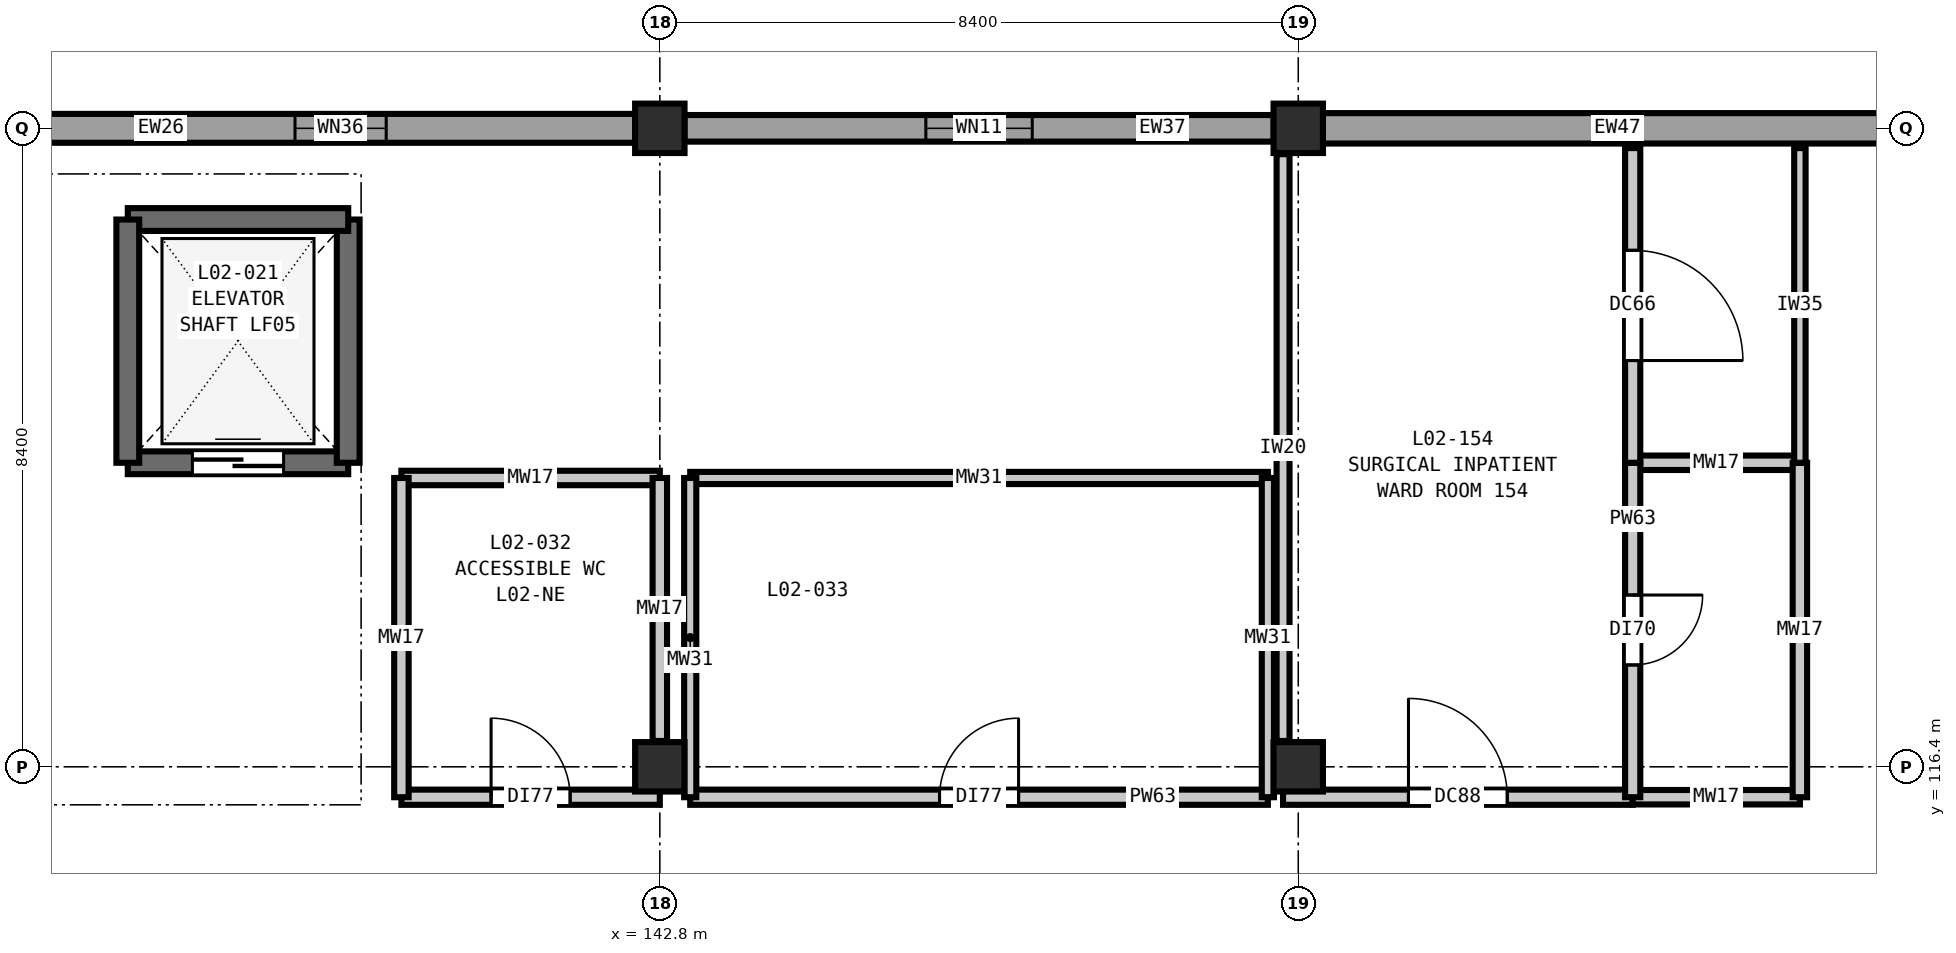
"""IFC4 building model, lengths in metres.
Left out: names, types, materials, properties, quantities, classifications, styles, units other than length and angle.
Written with IfcOpenShell. Run it as: python <this file> out.ifc"""

import sys

from ifc_helpers import new_model, si_unit, direction, frame, frame_2d, origin, origin_2d, place, context, subcontext, project, spatial, rectangle, extrude, element, fill, save


model = new_model("IFC4")
c1 = context("Model", 3, precision=1e-05, world=origin(), true_north=direction((0.0, 1.0)))
c2 = subcontext(c1, "Body", "Model", "MODEL_VIEW")
j1 = project(units=[si_unit("LENGTHUNIT", "METRE"), si_unit("PLANEANGLEUNIT", "RADIAN")], contexts=[c1])
p1 = place(None, origin())
s1 = spatial("IfcSite", under=j1, at=p1, CompositionType="ELEMENT")
p2 = place(p1, origin())
s2 = spatial("IfcBuilding", under=s1, at=p2, CompositionType="ELEMENT")
p3 = place(p2, frame((0.0, 0.0, 10.8)))
s3 = spatial("IfcBuildingStorey", under=s2, at=p3, CompositionType="ELEMENT", Elevation=10.8)
for number, where, z_axis, x_axis in (
    (1, (142.8, 116.4, 0.0), (0.0, 0.0, 1.0), (1.0, 0.0, 0.0)),
    (2, (142.8, 124.8, 0.0), (0.0, 0.0, 1.0), (1.0, 0.0, 0.0)),
    (3, (151.2, 116.4, 0.0), (0.0, 0.0, 1.0), (1.0, 0.0, 0.0)),
    (4, (151.2, 124.8, 0.0), (0.0, 0.0, 1.0), (1.0, 0.0, 0.0)),
):
    element("IfcColumn", number, at=place(p3, frame(where, z_axis=z_axis, x_axis=x_axis)), inside=s3, PredefinedType="COLUMN", context=c2, shape_type="SweptSolid", body=[
        extrude(rectangle(XDim=0.65, YDim=0.65, at=origin_2d()), origin(), (0.0, 0.0, 1.0), 5.4),
    ])
p4 = place(p3, frame((134.723, 124.8, 0.0), z_axis=(0.0, 0.0, 1.0), x_axis=(1.0, 0.0, 0.0)))
e5 = element("IfcWall", 5, at=p4, inside=s3, PredefinedType="SOLIDWALL", context=c2, shape_type="SweptSolid", body=[
    extrude(rectangle(XDim=7.754, YDim=0.38, at=frame_2d((3.877, 0.0))), origin(), (0.0, 0.0, 1.0), 4.68),
])
p5 = place(p4, frame((3.277, 0.0, 0.9)))
e6 = element("IfcOpeningElement", 6, at=p5, cuts=e5, PredefinedType="OPENING", context=c2, shape_type="SweptSolid", body=[
    extrude(rectangle(XDim=1.2, YDim=2.15, at=frame_2d((0.6, 1.075))), frame((0.0, 0.2, 0.0), z_axis=(0.0, -1.0, 0.0), x_axis=(1.0, 0.0, 0.0)), (0.0, 0.0, 1.0), 0.4),
])
p6 = place(p3, frame((143.123, 124.8, 0.0), z_axis=(0.0, 0.0, 1.0), x_axis=(1.0, 0.0, 0.0)))
e7 = element("IfcWall", 7, at=p6, inside=s3, PredefinedType="SOLIDWALL", context=c2, shape_type="SweptSolid", body=[
    extrude(rectangle(XDim=7.754, YDim=0.35, at=frame_2d((3.877, 0.0))), origin(), (0.0, 0.0, 1.0), 4.68),
])
p7 = place(p6, frame((3.177, 0.0, 0.9)))
e8 = element("IfcOpeningElement", 8, at=p7, cuts=e7, PredefinedType="OPENING", context=c2, shape_type="SweptSolid", body=[
    extrude(rectangle(XDim=1.4, YDim=2.15, at=frame_2d((0.7, 1.075))), frame((0.0, 0.185, 0.0), z_axis=(0.0, -1.0, 0.0), x_axis=(1.0, 0.0, 0.0)), (0.0, 0.0, 1.0), 0.37),
])
p8 = place(p3, frame((151.523, 124.8, 0.0), z_axis=(0.0, 0.0, 1.0), x_axis=(1.0, 0.0, 0.0)))
e9 = element("IfcWall", 9, at=p8, inside=s3, PredefinedType="SOLIDWALL", context=c2, shape_type="SweptSolid", body=[
    extrude(rectangle(XDim=7.754, YDim=0.4, at=frame_2d((3.877, 0.0))), origin(), (0.0, 0.0, 1.0), 4.68),
])
p9 = place(p3, frame((135.8, 120.4, 0.0), z_axis=(0.0, 0.0, 1.0), x_axis=(1.0, 0.0, 0.0)))
e10 = element("IfcWall", 10, at=p9, inside=s3, PredefinedType="SHEAR", context=c2, shape_type="SweptSolid", body=[
    extrude(rectangle(XDim=2.9, YDim=0.3, at=frame_2d((1.45, 0.0))), origin(), (0.0, 0.0, 1.0), 5.4),
])
p10 = place(p9, frame((0.85, 0.0, 0.0)))
e11 = element("IfcOpeningElement", 11, at=p10, cuts=e10, PredefinedType="OPENING", context=c2, shape_type="SweptSolid", body=[
    extrude(rectangle(XDim=1.2, YDim=2.2, at=frame_2d((0.6, 1.1))), frame((0.0, 0.16, 0.0), z_axis=(0.0, -1.0, 0.0), x_axis=(1.0, 0.0, 0.0)), (0.0, 0.0, 1.0), 0.32),
])
p11 = place(p3, frame((138.7, 120.4, 0.0), z_axis=(0.0, 0.0, 1.0), x_axis=(0.0, 1.0, 0.0)))
e12 = element("IfcWall", 12, at=p11, inside=s3, PredefinedType="SHEAR", context=c2, shape_type="SweptSolid", body=[
    extrude(rectangle(XDim=3.2, YDim=0.3, at=frame_2d((1.6, 0.0))), origin(), (0.0, 0.0, 1.0), 5.4),
])
p12 = place(p3, frame((138.7, 123.6, 0.0), z_axis=(0.0, 0.0, 1.0), x_axis=(-1.0, 0.0, 0.0)))
e13 = element("IfcWall", 13, at=p12, inside=s3, PredefinedType="SHEAR", context=c2, shape_type="SweptSolid", body=[
    extrude(rectangle(XDim=2.9, YDim=0.3, at=frame_2d((1.45, 0.0))), origin(), (0.0, 0.0, 1.0), 5.4),
])
p13 = place(p3, frame((135.8, 123.6, 0.0), z_axis=(0.0, 0.0, 1.0), x_axis=(0.0, -1.0, 0.0)))
e14 = element("IfcWall", 14, at=p13, inside=s3, PredefinedType="SHEAR", context=c2, shape_type="SweptSolid", body=[
    extrude(rectangle(XDim=3.2, YDim=0.3, at=frame_2d((1.6, 0.0))), origin(), (0.0, 0.0, 1.0), 5.4),
])
p14 = place(p3, frame((139.4, 116.0, 0.0), z_axis=(0.0, 0.0, 1.0), x_axis=(1.0, 0.0, 0.0)))
e15 = element("IfcWall", 15, at=p14, inside=s3, PredefinedType="PARTITIONING", context=c2, shape_type="SweptSolid", body=[
    extrude(rectangle(XDim=3.4, YDim=0.2, at=frame_2d((1.7, 0.0))), origin(), (0.0, 0.0, 1.0), 5.07),
])
p15 = place(p14, frame((1.18, 0.0, 0.0)))
e16 = element("IfcOpeningElement", 16, at=p15, cuts=e15, PredefinedType="OPENING", context=c2, shape_type="SweptSolid", body=[
    extrude(rectangle(XDim=1.04, YDim=2.1, at=frame_2d((0.52, 1.05))), frame((0.0, 0.11, 0.0), z_axis=(0.0, -1.0, 0.0), x_axis=(1.0, 0.0, 0.0)), (0.0, 0.0, 1.0), 0.22),
])
p16 = place(p3, frame((143.2, 116.0, 0.0), z_axis=(0.0, 0.0, 1.0), x_axis=(1.0, 0.0, 0.0)))
e17 = element("IfcWall", 17, at=p16, inside=s3, PredefinedType="PARTITIONING", context=c2, shape_type="SweptSolid", body=[
    extrude(rectangle(XDim=7.6, YDim=0.2, at=frame_2d((3.8, 0.0))), origin(), (0.0, 0.0, 1.0), 5.07),
])
p17 = place(p16, frame((3.28, 0.0, 0.0)))
e18 = element("IfcOpeningElement", 18, at=p17, cuts=e17, PredefinedType="OPENING", context=c2, shape_type="SweptSolid", body=[
    extrude(rectangle(XDim=1.04, YDim=2.1, at=frame_2d((0.52, 1.05))), frame((0.0, 0.11, 0.0), z_axis=(0.0, -1.0, 0.0), x_axis=(1.0, 0.0, 0.0)), (0.0, 0.0, 1.0), 0.22),
])
p18 = place(p3, frame((151.0, 116.0, 0.0), z_axis=(0.0, 0.0, 1.0), x_axis=(1.0, 0.0, 0.0)))
e19 = element("IfcWall", 19, at=p18, inside=s3, PredefinedType="PARTITIONING", context=c2, shape_type="SweptSolid", body=[
    extrude(rectangle(XDim=4.6, YDim=0.2, at=frame_2d((2.3, 0.0))), origin(), (0.0, 0.0, 1.0), 5.07),
])
p19 = place(p18, frame((1.65, 0.0, 0.0)))
e20 = element("IfcOpeningElement", 20, at=p19, cuts=e19, PredefinedType="OPENING", context=c2, shape_type="SweptSolid", body=[
    extrude(rectangle(XDim=1.3, YDim=2.2, at=frame_2d((0.65, 1.1))), frame((0.0, 0.11, 0.0), z_axis=(0.0, -1.0, 0.0), x_axis=(1.0, 0.0, 0.0)), (0.0, 0.0, 1.0), 0.22),
])
p20 = place(p3, frame((155.6, 116.0, 0.0), z_axis=(0.0, 0.0, 1.0), x_axis=(1.0, 0.0, 0.0)))
e21 = element("IfcWall", 21, at=p20, inside=s3, PredefinedType="PLUMBINGWALL", context=c2, shape_type="SweptSolid", body=[
    extrude(rectangle(XDim=2.2, YDim=0.19, at=frame_2d((1.1, 0.0))), origin(), (0.0, 0.0, 1.0), 5.07),
])
p21 = place(p3, frame((139.4, 120.2, 0.0), z_axis=(0.0, 0.0, 1.0), x_axis=(1.0, 0.0, 0.0)))
e22 = element("IfcWall", 22, at=p21, inside=s3, PredefinedType="PLUMBINGWALL", context=c2, shape_type="SweptSolid", body=[
    extrude(rectangle(XDim=3.4, YDim=0.19, at=frame_2d((1.7, 0.0))), origin(), (0.0, 0.0, 1.0), 5.07),
])
p22 = place(p3, frame((143.2, 120.2, 0.0), z_axis=(0.0, 0.0, 1.0), x_axis=(1.0, 0.0, 0.0)))
e23 = element("IfcWall", 23, at=p22, inside=s3, PredefinedType="PLUMBINGWALL", context=c2, shape_type="SweptSolid", body=[
    extrude(rectangle(XDim=7.6, YDim=0.16, at=frame_2d((3.8, 0.0))), origin(), (0.0, 0.0, 1.0), 5.07),
])
p23 = place(p3, frame((155.6, 120.4, 0.0), z_axis=(0.0, 0.0, 1.0), x_axis=(1.0, 0.0, 0.0)))
e24 = element("IfcWall", 24, at=p23, inside=s3, PredefinedType="PLUMBINGWALL", context=c2, shape_type="SweptSolid", body=[
    extrude(rectangle(XDim=2.2, YDim=0.19, at=frame_2d((1.1, 0.0))), origin(), (0.0, 0.0, 1.0), 5.07),
])
p24 = place(p3, frame((139.4, 116.0, 0.0), z_axis=(0.0, 0.0, 1.0), x_axis=(0.0, 1.0, 0.0)))
e25 = element("IfcWall", 25, at=p24, inside=s3, PredefinedType="PLUMBINGWALL", context=c2, shape_type="SweptSolid", body=[
    extrude(rectangle(XDim=4.2, YDim=0.19, at=frame_2d((2.1, 0.0))), origin(), (0.0, 0.0, 1.0), 5.07),
])
p25 = place(p3, frame((142.8, 116.74, 0.0), z_axis=(0.0, 0.0, 1.0), x_axis=(0.0, 1.0, 0.0)))
e26 = element("IfcWall", 26, at=p25, inside=s3, PredefinedType="PLUMBINGWALL", context=c2, shape_type="SweptSolid", body=[
    extrude(rectangle(XDim=3.46, YDim=0.19, at=frame_2d((1.73, 0.0))), origin(), (0.0, 0.0, 1.0), 4.735),
])
for number, where, z_axis, x_axis in (
    (27, (143.2, 116.0, 0.0), (0.0, 0.0, 1.0), (0.0, 1.0, 0.0)),
    (28, (150.8, 116.0, 0.0), (0.0, 0.0, 1.0), (0.0, 1.0, 0.0)),
):
    element("IfcWall", number, at=place(p3, frame(where, z_axis=z_axis, x_axis=x_axis)), inside=s3, PredefinedType="PLUMBINGWALL", context=c2, shape_type="SweptSolid", body=[
        extrude(rectangle(XDim=4.2, YDim=0.16, at=frame_2d((2.1, 0.0))), origin(), (0.0, 0.0, 1.0), 5.07),
    ])
p26 = place(p3, frame((151.0, 116.74, 0.0), z_axis=(0.0, 0.0, 1.0), x_axis=(0.0, 1.0, 0.0)))
e29 = element("IfcWall", 29, at=p26, inside=s3, PredefinedType="PARTITIONING", context=c2, shape_type="SweptSolid", body=[
    extrude(rectangle(XDim=7.72, YDim=0.17, at=frame_2d((3.86, 0.0))), origin(), (0.0, 0.0, 1.0), 4.735),
])
p27 = place(p3, frame((155.6, 116.0, 0.0), z_axis=(0.0, 0.0, 1.0), x_axis=(0.0, 1.0, 0.0)))
e30 = element("IfcWall", 30, at=p27, inside=s3, PredefinedType="PARTITIONING", context=c2, shape_type="SweptSolid", body=[
    extrude(rectangle(XDim=4.4, YDim=0.2, at=frame_2d((2.2, 0.0))), origin(), (0.0, 0.0, 1.0), 5.07),
])
p28 = place(p27, frame((1.74, 0.0, 0.0)))
e31 = element("IfcOpeningElement", 31, at=p28, cuts=e30, PredefinedType="OPENING", context=c2, shape_type="SweptSolid", body=[
    extrude(rectangle(XDim=0.92, YDim=2.1, at=frame_2d((0.46, 1.05))), frame((0.0, 0.11, 0.0), z_axis=(0.0, -1.0, 0.0), x_axis=(1.0, 0.0, 0.0)), (0.0, 0.0, 1.0), 0.22),
])
p29 = place(p3, frame((155.6, 120.4, 0.0), z_axis=(0.0, 0.0, 1.0), x_axis=(0.0, 1.0, 0.0)))
e32 = element("IfcWall", 32, at=p29, inside=s3, PredefinedType="PARTITIONING", context=c2, shape_type="SweptSolid", body=[
    extrude(rectangle(XDim=4.14, YDim=0.2, at=frame_2d((2.07, 0.0))), origin(), (0.0, 0.0, 1.0), 5.07),
])
p30 = place(p29, frame((1.345, 0.0, 0.0)))
e33 = element("IfcOpeningElement", 33, at=p30, cuts=e32, PredefinedType="OPENING", context=c2, shape_type="SweptSolid", body=[
    extrude(rectangle(XDim=1.45, YDim=2.25, at=frame_2d((0.725, 1.125))), frame((0.0, 0.11, 0.0), z_axis=(0.0, -1.0, 0.0), x_axis=(1.0, 0.0, 0.0)), (0.0, 0.0, 1.0), 0.22),
])
p31 = place(p3, frame((157.8, 116.0, 0.0), z_axis=(0.0, 0.0, 1.0), x_axis=(0.0, 1.0, 0.0)))
e34 = element("IfcWall", 34, at=p31, inside=s3, PredefinedType="PLUMBINGWALL", context=c2, shape_type="SweptSolid", body=[
    extrude(rectangle(XDim=4.4, YDim=0.19, at=frame_2d((2.2, 0.0))), origin(), (0.0, 0.0, 1.0), 5.07),
])
p32 = place(p3, frame((157.8, 120.4, 0.0), z_axis=(0.0, 0.0, 1.0), x_axis=(0.0, 1.0, 0.0)))
e35 = element("IfcWall", 35, at=p32, inside=s3, PredefinedType="PARTITIONING", context=c2, shape_type="SweptSolid", body=[
    extrude(rectangle(XDim=4.14, YDim=0.15, at=frame_2d((2.07, 0.0))), origin(), (0.0, 0.0, 1.0), 5.07),
])
p33 = place(p5, origin())
e36 = element("IfcWindow", 36, at=p33, inside=s3, PartitioningType="SINGLE_PANEL", PredefinedType="WINDOW", context=c2, shape_type="SweptSolid", body=[
    extrude(rectangle(XDim=1.2, YDim=2.15, at=frame_2d((0.6, 1.075))), frame((0.0, 0.03, 0.0), z_axis=(0.0, -1.0, 0.0), x_axis=(1.0, 0.0, 0.0)), (0.0, 0.0, 1.0), 0.06),
])
fill(e6, e36)
p34 = place(p7, origin())
e37 = element("IfcWindow", 37, at=p34, inside=s3, PartitioningType="SINGLE_PANEL", PredefinedType="WINDOW", context=c2, shape_type="SweptSolid", body=[
    extrude(rectangle(XDim=1.4, YDim=2.15, at=frame_2d((0.7, 1.075))), frame((0.0, 0.03, 0.0), z_axis=(0.0, -1.0, 0.0), x_axis=(1.0, 0.0, 0.0)), (0.0, 0.0, 1.0), 0.06),
])
fill(e8, e37)
p35 = place(p10, origin())
e38 = element("IfcDoor", 38, at=p35, inside=s3, OperationType="DOUBLE_DOOR_SLIDING", PredefinedType="DOOR", context=c2, shape_type="SweptSolid", body=[
    extrude(rectangle(XDim=1.2, YDim=2.2, at=frame_2d((0.6, 1.1))), frame((0.0, 0.025, 0.0), z_axis=(0.0, -1.0, 0.0), x_axis=(1.0, 0.0, 0.0)), (0.0, 0.0, 1.0), 0.05),
])
fill(e11, e38)
p36 = place(p15, origin())
e39 = element("IfcDoor", 39, at=p36, inside=s3, OperationType="SINGLE_SWING_LEFT", PredefinedType="DOOR", context=c2, shape_type="SweptSolid", body=[
    extrude(rectangle(XDim=1.04, YDim=2.1, at=frame_2d((0.52, 1.05))), frame((0.0, 0.025, 0.0), z_axis=(0.0, -1.0, 0.0), x_axis=(1.0, 0.0, 0.0)), (0.0, 0.0, 1.0), 0.05),
])
fill(e16, e39)
p37 = place(p17, origin())
e40 = element("IfcDoor", 40, at=p37, inside=s3, OperationType="SINGLE_SWING_RIGHT", PredefinedType="DOOR", context=c2, shape_type="SweptSolid", body=[
    extrude(rectangle(XDim=1.04, YDim=2.1, at=frame_2d((0.52, 1.05))), frame((0.0, 0.025, 0.0), z_axis=(0.0, -1.0, 0.0), x_axis=(1.0, 0.0, 0.0)), (0.0, 0.0, 1.0), 0.05),
])
fill(e18, e40)
p38 = place(p19, origin())
e41 = element("IfcDoor", 41, at=p38, inside=s3, OperationType="SINGLE_SWING_LEFT", PredefinedType="DOOR", context=c2, shape_type="SweptSolid", body=[
    extrude(rectangle(XDim=1.3, YDim=2.2, at=frame_2d((0.65, 1.1))), frame((0.0, 0.025, 0.0), z_axis=(0.0, -1.0, 0.0), x_axis=(1.0, 0.0, 0.0)), (0.0, 0.0, 1.0), 0.05),
])
fill(e20, e41)
p39 = place(p28, frame((0.92, 0.0, 0.0), z_axis=(0.0, 0.0, 1.0), x_axis=(-1.0, 0.0, 0.0)))
e42 = element("IfcDoor", 42, at=p39, inside=s3, OperationType="SINGLE_SWING_LEFT", PredefinedType="DOOR", context=c2, shape_type="SweptSolid", body=[
    extrude(rectangle(XDim=0.92, YDim=2.1, at=frame_2d((0.46, 1.05))), frame((0.0, 0.025, 0.0), z_axis=(0.0, -1.0, 0.0), x_axis=(1.0, 0.0, 0.0)), (0.0, 0.0, 1.0), 0.05),
])
fill(e31, e42)
p40 = place(p30, frame((1.45, 0.0, 0.0), z_axis=(0.0, 0.0, 1.0), x_axis=(-1.0, 0.0, 0.0)))
e43 = element("IfcDoor", 43, at=p40, inside=s3, OperationType="SINGLE_SWING_RIGHT", PredefinedType="DOOR", context=c2, shape_type="SweptSolid", body=[
    extrude(rectangle(XDim=1.45, YDim=2.25, at=frame_2d((0.725, 1.125))), frame((0.0, 0.025, 0.0), z_axis=(0.0, -1.0, 0.0), x_axis=(1.0, 0.0, 0.0)), (0.0, 0.0, 1.0), 0.05),
])
fill(e33, e43)
save(model, sys.argv[1])
